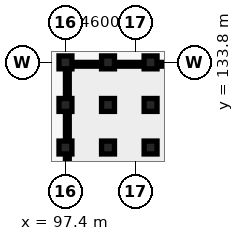
"""IFC4 building model, lengths in metres.
Left out: names, types, materials, properties, quantities, classifications, styles, units other than length and angle.
Written with IfcOpenShell. Run it as: python <this file> out.ifc"""

import sys

from ifc_helpers import new_model, si_unit, direction, frame, frame_2d, origin, origin_2d, place, context, subcontext, project, spatial, rectangle, extrude, element, fill, save


model = new_model("IFC4")
c1 = context("Model", 3, precision=1e-05, world=origin(), true_north=direction((0.0, 1.0)))
c2 = subcontext(c1, "Body", "Model", "MODEL_VIEW")
j1 = project(units=[si_unit("LENGTHUNIT", "METRE"), si_unit("PLANEANGLEUNIT", "RADIAN")], contexts=[c1])
p1 = place(None, origin())
s1 = spatial("IfcSite", under=j1, at=p1, CompositionType="ELEMENT")
p2 = place(p1, origin())
s2 = spatial("IfcBuilding", under=s1, at=p2, CompositionType="ELEMENT")
p3 = place(p2, origin())
s3 = spatial("IfcBuildingStorey", under=s2, at=p3, CompositionType="ELEMENT", Elevation=0.0)
for number, where, z_axis, x_axis in (
    (1, (103.0, 128.2, 0.0), (0.0, 0.0, 1.0), (1.0, 0.0, 0.0)),
    (2, (103.0, 131.0, 0.0), (0.0, 0.0, 1.0), (1.0, 0.0, 0.0)),
    (3, (103.0, 133.8, 0.0), (0.0, 0.0, 1.0), (1.0, 0.0, 0.0)),
    (4, (100.2, 128.2, 0.0), (0.0, 0.0, 1.0), (1.0, 0.0, 0.0)),
    (5, (100.2, 131.0, 0.0), (0.0, 0.0, 1.0), (1.0, 0.0, 0.0)),
    (6, (100.2, 133.8, 0.0), (0.0, 0.0, 1.0), (1.0, 0.0, 0.0)),
    (7, (97.4, 128.2, 0.0), (0.0, 0.0, 1.0), (1.0, 0.0, 0.0)),
    (8, (97.4, 131.0, 0.0), (0.0, 0.0, 1.0), (1.0, 0.0, 0.0)),
    (9, (97.4, 133.8, 0.0), (0.0, 0.0, 1.0), (1.0, 0.0, 0.0)),
):
    element("IfcColumn", number, at=place(p3, frame(where, z_axis=z_axis, x_axis=x_axis)), inside=s3, PredefinedType="COLUMN", context=c2, shape_type="SweptSolid", body=[
        extrude(rectangle(XDim=0.85, YDim=0.85, at=origin_2d()), origin(), (0.0, 0.0, 1.0), 4.15),
    ])
p4 = place(p3, frame((105.72, 128.2, 0.0), z_axis=(0.0, 0.0, 1.0), x_axis=(-1.0, 0.0, 0.0)))
e10 = element("IfcWall", 10, at=p4, inside=s3, PredefinedType="PLUMBINGWALL", context=c2, shape_type="SweptSolid", body=[
    extrude(rectangle(XDim=2.64, YDim=0.16, at=frame_2d((1.32, 0.0))), origin(), (0.0, 0.0, 1.0), 3.492),
])
p5 = place(p4, frame((0.92, 0.0, 0.0)))
e11 = element("IfcOpeningElement", 11, at=p5, cuts=e10, PredefinedType="OPENING", context=c2, shape_type="SweptSolid", body=[
    extrude(rectangle(XDim=0.8, YDim=2.1, at=frame_2d((0.4, 1.05))), frame((0.0, 0.09, 0.0), z_axis=(0.0, -1.0, 0.0), x_axis=(1.0, 0.0, 0.0)), (0.0, 0.0, 1.0), 0.18),
])
p6 = place(p3, frame((102.92, 128.2, 0.0), z_axis=(0.0, 0.0, 1.0), x_axis=(-1.0, 0.0, 0.0)))
e12 = element("IfcWall", 12, at=p6, inside=s3, PredefinedType="PLUMBINGWALL", context=c2, shape_type="SweptSolid", body=[
    extrude(rectangle(XDim=2.64, YDim=0.16, at=frame_2d((1.32, 0.0))), origin(), (0.0, 0.0, 1.0), 3.492),
])
p7 = place(p6, frame((0.87, 0.0, 0.0)))
e13 = element("IfcOpeningElement", 13, at=p7, cuts=e12, PredefinedType="OPENING", context=c2, shape_type="SweptSolid", body=[
    extrude(rectangle(XDim=0.9, YDim=2.1, at=frame_2d((0.45, 1.05))), frame((0.0, 0.09, 0.0), z_axis=(0.0, -1.0, 0.0), x_axis=(1.0, 0.0, 0.0)), (0.0, 0.0, 1.0), 0.18),
])
p8 = place(p3, frame((100.12, 128.2, 0.0), z_axis=(0.0, 0.0, 1.0), x_axis=(-1.0, 0.0, 0.0)))
e14 = element("IfcWall", 14, at=p8, inside=s3, PredefinedType="PLUMBINGWALL", context=c2, shape_type="SweptSolid", body=[
    extrude(rectangle(XDim=2.64, YDim=0.16, at=frame_2d((1.32, 0.0))), origin(), (0.0, 0.0, 1.0), 3.492),
])
p9 = place(p8, frame((0.92, 0.0, 0.0)))
e15 = element("IfcOpeningElement", 15, at=p9, cuts=e14, PredefinedType="OPENING", context=c2, shape_type="SweptSolid", body=[
    extrude(rectangle(XDim=0.8, YDim=2.1, at=frame_2d((0.4, 1.05))), frame((0.0, 0.09, 0.0), z_axis=(0.0, -1.0, 0.0), x_axis=(1.0, 0.0, 0.0)), (0.0, 0.0, 1.0), 0.18),
])
p10 = place(p3, frame((103.0, 122.7, 0.0), z_axis=(0.0, 0.0, 1.0), x_axis=(0.0, 1.0, 0.0)))
e16 = element("IfcWall", 16, at=p10, inside=s3, PredefinedType="STANDARD", context=c2, shape_type="SweptSolid", body=[
    extrude(rectangle(XDim=10.82, YDim=0.22, at=frame_2d((5.41, 0.0))), origin(), (0.0, 0.0, 1.0), 3.492),
])
p11 = place(p3, frame((100.2, 122.7, 0.0), z_axis=(0.0, 0.0, 1.0), x_axis=(0.0, 1.0, 0.0)))
e17 = element("IfcWall", 17, at=p11, inside=s3, PredefinedType="PARTITIONING", context=c2, shape_type="SweptSolid", body=[
    extrude(rectangle(XDim=10.82, YDim=0.15, at=frame_2d((5.41, 0.0))), origin(), (0.0, 0.0, 1.0), 3.492),
])
p12 = place(p11, frame((0.899, 0.0, 0.0)))
e18 = element("IfcOpeningElement", 18, at=p12, cuts=e17, PredefinedType="OPENING", context=c2, shape_type="SweptSolid", body=[
    extrude(rectangle(XDim=0.8, YDim=2.1, at=frame_2d((0.4, 1.05))), frame((0.0, 0.085, 0.0), z_axis=(0.0, -1.0, 0.0), x_axis=(1.0, 0.0, 0.0)), (0.0, 0.0, 1.0), 0.17),
])
p13 = place(p3, frame((105.372, 133.675, 0.0), z_axis=(0.0, 0.0, 1.0), x_axis=(-1.0, 0.0, 0.0)))
e19 = element("IfcWall", 19, at=p13, inside=s3, PredefinedType="STANDARD", context=c2, shape_type="SweptSolid", body=[
    extrude(rectangle(XDim=1.943, YDim=0.25, at=frame_2d((0.972, 0.0))), origin(), (0.0, 0.0, 1.0), 3.692),
])
p14 = place(p13, frame((0.372, 0.0, 0.88)))
e20 = element("IfcOpeningElement", 20, at=p14, cuts=e19, PredefinedType="OPENING", context=c2, shape_type="SweptSolid", body=[
    extrude(rectangle(XDim=1.2, YDim=1.5, at=frame_2d((0.6, 0.75))), frame((0.0, 0.135, 0.0), z_axis=(0.0, -1.0, 0.0), x_axis=(1.0, 0.0, 0.0)), (0.0, 0.0, 1.0), 0.27),
])
p15 = place(p3, frame((102.572, 133.675, 0.0), z_axis=(0.0, 0.0, 1.0), x_axis=(-1.0, 0.0, 0.0)))
e21 = element("IfcWall", 21, at=p15, inside=s3, PredefinedType="STANDARD", context=c2, shape_type="SweptSolid", body=[
    extrude(rectangle(XDim=1.943, YDim=0.25, at=frame_2d((0.972, 0.0))), origin(), (0.0, 0.0, 1.0), 3.692),
])
p16 = place(p15, frame((0.372, 0.0, 0.88)))
e22 = element("IfcOpeningElement", 22, at=p16, cuts=e21, PredefinedType="OPENING", context=c2, shape_type="SweptSolid", body=[
    extrude(rectangle(XDim=1.2, YDim=1.5, at=frame_2d((0.6, 0.75))), frame((0.0, 0.135, 0.0), z_axis=(0.0, -1.0, 0.0), x_axis=(1.0, 0.0, 0.0)), (0.0, 0.0, 1.0), 0.27),
])
p17 = place(p3, frame((99.771, 133.675, 0.0), z_axis=(0.0, 0.0, 1.0), x_axis=(-1.0, 0.0, 0.0)))
e23 = element("IfcWall", 23, at=p17, inside=s3, PredefinedType="STANDARD", context=c2, shape_type="SweptSolid", body=[
    extrude(rectangle(XDim=1.943, YDim=0.25, at=frame_2d((0.971, 0.0))), origin(), (0.0, 0.0, 1.0), 3.692),
])
p18 = place(p17, frame((0.421, 0.0, 0.88)))
e24 = element("IfcOpeningElement", 24, at=p18, cuts=e23, PredefinedType="OPENING", context=c2, shape_type="SweptSolid", body=[
    extrude(rectangle(XDim=1.1, YDim=1.45, at=frame_2d((0.55, 0.725))), frame((0.0, 0.135, 0.0), z_axis=(0.0, -1.0, 0.0), x_axis=(1.0, 0.0, 0.0)), (0.0, 0.0, 1.0), 0.27),
])
p19 = place(p3, frame((97.525, 125.82, 0.0), z_axis=(0.0, 0.0, 1.0), x_axis=(0.0, 1.0, 0.0)))
e25 = element("IfcWall", 25, at=p19, inside=s3, PredefinedType="STANDARD", context=c2, shape_type="SweptSolid", body=[
    extrude(rectangle(XDim=1.96, YDim=0.25, at=frame_2d((0.98, 0.0))), origin(), (0.0, 0.0, 1.0), 3.492),
])
p20 = place(p19, frame((0.38, 0.0, 0.88)))
e26 = element("IfcOpeningElement", 26, at=p20, cuts=e25, PredefinedType="OPENING", context=c2, shape_type="SweptSolid", body=[
    extrude(rectangle(XDim=1.2, YDim=1.5, at=frame_2d((0.6, 0.75))), frame((0.0, 0.135, 0.0), z_axis=(0.0, -1.0, 0.0), x_axis=(1.0, 0.0, 0.0)), (0.0, 0.0, 1.0), 0.27),
])
p21 = place(p3, frame((97.525, 128.62, 0.0), z_axis=(0.0, 0.0, 1.0), x_axis=(0.0, 1.0, 0.0)))
e27 = element("IfcWall", 27, at=p21, inside=s3, PredefinedType="STANDARD", context=c2, shape_type="SweptSolid", body=[
    extrude(rectangle(XDim=1.96, YDim=0.25, at=frame_2d((0.98, 0.0))), origin(), (0.0, 0.0, 1.0), 3.492),
])
p22 = place(p21, frame((0.38, 0.0, 0.88)))
e28 = element("IfcOpeningElement", 28, at=p22, cuts=e27, PredefinedType="OPENING", context=c2, shape_type="SweptSolid", body=[
    extrude(rectangle(XDim=1.2, YDim=1.5, at=frame_2d((0.6, 0.75))), frame((0.0, 0.135, 0.0), z_axis=(0.0, -1.0, 0.0), x_axis=(1.0, 0.0, 0.0)), (0.0, 0.0, 1.0), 0.27),
])
p23 = place(p3, frame((97.525, 131.42, 0.0), z_axis=(0.0, 0.0, 1.0), x_axis=(0.0, 1.0, 0.0)))
e29 = element("IfcWall", 29, at=p23, inside=s3, PredefinedType="STANDARD", context=c2, shape_type="SweptSolid", body=[
    extrude(rectangle(XDim=1.96, YDim=0.25, at=frame_2d((0.98, 0.0))), origin(), (0.0, 0.0, 1.0), 3.492),
])
p24 = place(p23, frame((0.38, 0.0, 0.88)))
e30 = element("IfcOpeningElement", 30, at=p24, cuts=e29, PredefinedType="OPENING", context=c2, shape_type="SweptSolid", body=[
    extrude(rectangle(XDim=1.2, YDim=1.5, at=frame_2d((0.6, 0.75))), frame((0.0, 0.135, 0.0), z_axis=(0.0, -1.0, 0.0), x_axis=(1.0, 0.0, 0.0)), (0.0, 0.0, 1.0), 0.27),
])
p25 = place(p14, origin())
e31 = element("IfcWindow", 31, at=p25, inside=s3, PartitioningType="SINGLE_PANEL", PredefinedType="WINDOW", context=c2, shape_type="SweptSolid", body=[
    extrude(rectangle(XDim=1.2, YDim=1.5, at=frame_2d((0.6, 0.75))), frame((0.0, 0.03, 0.0), z_axis=(0.0, -1.0, 0.0), x_axis=(1.0, 0.0, 0.0)), (0.0, 0.0, 1.0), 0.06),
])
fill(e20, e31)
p26 = place(p16, origin())
e32 = element("IfcWindow", 32, at=p26, inside=s3, PartitioningType="SINGLE_PANEL", PredefinedType="WINDOW", context=c2, shape_type="SweptSolid", body=[
    extrude(rectangle(XDim=1.2, YDim=1.5, at=frame_2d((0.6, 0.75))), frame((0.0, 0.03, 0.0), z_axis=(0.0, -1.0, 0.0), x_axis=(1.0, 0.0, 0.0)), (0.0, 0.0, 1.0), 0.06),
])
fill(e22, e32)
p27 = place(p18, origin())
e33 = element("IfcWindow", 33, at=p27, inside=s3, PartitioningType="SINGLE_PANEL", PredefinedType="WINDOW", context=c2, shape_type="SweptSolid", body=[
    extrude(rectangle(XDim=1.1, YDim=1.45, at=frame_2d((0.55, 0.725))), frame((0.0, 0.03, 0.0), z_axis=(0.0, -1.0, 0.0), x_axis=(1.0, 0.0, 0.0)), (0.0, 0.0, 1.0), 0.06),
])
fill(e24, e33)
p28 = place(p20, origin())
e34 = element("IfcWindow", 34, at=p28, inside=s3, PartitioningType="SINGLE_PANEL", PredefinedType="WINDOW", context=c2, shape_type="SweptSolid", body=[
    extrude(rectangle(XDim=1.2, YDim=1.5, at=frame_2d((0.6, 0.75))), frame((0.0, 0.03, 0.0), z_axis=(0.0, -1.0, 0.0), x_axis=(1.0, 0.0, 0.0)), (0.0, 0.0, 1.0), 0.06),
])
fill(e26, e34)
p29 = place(p22, origin())
e35 = element("IfcWindow", 35, at=p29, inside=s3, PartitioningType="SINGLE_PANEL", PredefinedType="WINDOW", context=c2, shape_type="SweptSolid", body=[
    extrude(rectangle(XDim=1.2, YDim=1.5, at=frame_2d((0.6, 0.75))), frame((0.0, 0.03, 0.0), z_axis=(0.0, -1.0, 0.0), x_axis=(1.0, 0.0, 0.0)), (0.0, 0.0, 1.0), 0.06),
])
fill(e28, e35)
p30 = place(p24, origin())
e36 = element("IfcWindow", 36, at=p30, inside=s3, PartitioningType="SINGLE_PANEL", PredefinedType="WINDOW", context=c2, shape_type="SweptSolid", body=[
    extrude(rectangle(XDim=1.2, YDim=1.5, at=frame_2d((0.6, 0.75))), frame((0.0, 0.03, 0.0), z_axis=(0.0, -1.0, 0.0), x_axis=(1.0, 0.0, 0.0)), (0.0, 0.0, 1.0), 0.06),
])
fill(e30, e36)
p31 = place(p7, origin())
e37 = element("IfcDoor", 37, at=p31, inside=s3, OperationType="SINGLE_SWING_LEFT", PredefinedType="DOOR", context=c2, shape_type="SweptSolid", body=[
    extrude(rectangle(XDim=0.9, YDim=2.1, at=frame_2d((0.45, 1.05))), frame((0.0, 0.025, 0.0), z_axis=(0.0, -1.0, 0.0), x_axis=(1.0, 0.0, 0.0)), (0.0, 0.0, 1.0), 0.05),
])
fill(e13, e37)
p32 = place(p9, origin())
e38 = element("IfcDoor", 38, at=p32, inside=s3, OperationType="SINGLE_SWING_LEFT", PredefinedType="DOOR", context=c2, shape_type="SweptSolid", body=[
    extrude(rectangle(XDim=0.8, YDim=2.1, at=frame_2d((0.4, 1.05))), frame((0.0, 0.025, 0.0), z_axis=(0.0, -1.0, 0.0), x_axis=(1.0, 0.0, 0.0)), (0.0, 0.0, 1.0), 0.05),
])
fill(e15, e38)
save(model, sys.argv[1])
